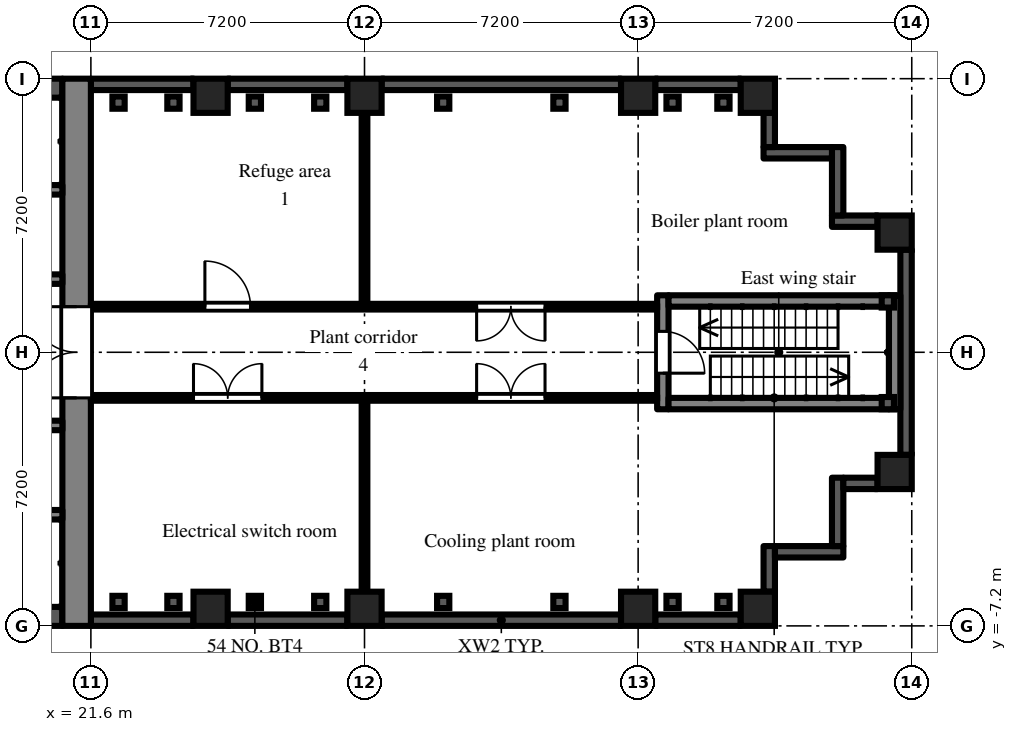
"""IFC4 building model, lengths in metres.
Left out: names, types, materials, properties, quantities, classifications, styles, units other than length and angle.
Written with IfcOpenShell. Run it as: python <this file> out.ifc"""

import sys

from ifc_helpers import new_model, si_unit, direction, frame, frame_2d, origin, origin_2d, place, context, subcontext, project, spatial, rectangle, extrude, element, fill, save


model = new_model("IFC4")
c1 = context("Model", 3, precision=1e-05, world=origin(), true_north=direction((0.0, 1.0)))
c2 = subcontext(c1, "Body", "Model", "MODEL_VIEW")
j1 = project(units=[si_unit("LENGTHUNIT", "METRE"), si_unit("PLANEANGLEUNIT", "RADIAN")], contexts=[c1])
p1 = place(None, origin())
s1 = spatial("IfcSite", under=j1, at=p1, CompositionType="ELEMENT")
p2 = place(p1, origin())
s2 = spatial("IfcBuilding", under=s1, at=p2, CompositionType="ELEMENT")
p3 = place(p2, frame((0.0, 0.0, 111.9)))
s3 = spatial("IfcBuildingStorey", under=s2, at=p3, CompositionType="ELEMENT", Elevation=111.9)
for number, where, z_axis, x_axis in (
    (1, (24.75, -6.75, 0.0), (0.0, 0.0, 1.0), (1.0, 0.0, 0.0)),
    (2, (24.75, 6.75, 0.0), (0.0, 0.0, 1.0), (1.0, 0.0, 0.0)),
    (3, (28.8, -6.75, 0.0), (0.0, 0.0, 1.0), (1.0, 0.0, 0.0)),
    (4, (28.8, 6.75, 0.0), (0.0, 0.0, 1.0), (1.0, 0.0, 0.0)),
    (5, (36.0, -6.75, 0.0), (0.0, 0.0, 1.0), (1.0, 0.0, 0.0)),
    (6, (36.0, 6.75, 0.0), (0.0, 0.0, 1.0), (1.0, 0.0, 0.0)),
    (7, (39.15, -6.75, 0.0), (0.0, 0.0, 1.0), (1.0, 0.0, 0.0)),
    (8, (39.15, 6.75, 0.0), (0.0, 0.0, 1.0), (1.0, 0.0, 0.0)),
    (9, (42.75, -3.15, 0.0), (0.0, 0.0, 1.0), (1.0, 0.0, 0.0)),
    (10, (42.75, 3.15, 0.0), (0.0, 0.0, 1.0), (1.0, 0.0, 0.0)),
):
    element("IfcColumn", number, at=place(p3, frame(where, z_axis=z_axis, x_axis=x_axis)), inside=s3, PredefinedType="COLUMN", context=c2, shape_type="SweptSolid", body=[
        extrude(rectangle(XDim=0.9, YDim=0.9, at=origin_2d()), origin(), (0.0, 0.0, 1.0), 4.2),
    ])
p4 = place(p3, frame((21.6, -7.05, 0.0), z_axis=(0.0, 0.0, 1.0), x_axis=(1.0, 0.0, 0.0)))
e11 = element("IfcWall", 11, at=p4, inside=s3, PredefinedType="SOLIDWALL", context=c2, shape_type="SweptSolid", body=[
    extrude(rectangle(XDim=2.7, YDim=0.3, at=frame_2d((1.35, 0.0))), origin(), (0.0, 0.0, 1.0), 3.4),
])
p5 = place(p3, frame((25.2, -7.05, 0.0), z_axis=(0.0, 0.0, 1.0), x_axis=(1.0, 0.0, 0.0)))
e12 = element("IfcWall", 12, at=p5, inside=s3, PredefinedType="SOLIDWALL", context=c2, shape_type="SweptSolid", body=[
    extrude(rectangle(XDim=3.15, YDim=0.3, at=frame_2d((1.575, 0.0))), origin(), (0.0, 0.0, 1.0), 3.4),
])
p6 = place(p3, frame((29.25, -7.05, 0.0), z_axis=(0.0, 0.0, 1.0), x_axis=(1.0, 0.0, 0.0)))
e13 = element("IfcWall", 13, at=p6, inside=s3, PredefinedType="SOLIDWALL", context=c2, shape_type="SweptSolid", body=[
    extrude(rectangle(XDim=6.3, YDim=0.3, at=frame_2d((3.15, 0.0))), origin(), (0.0, 0.0, 1.0), 3.4),
])
p7 = place(p3, frame((36.45, -7.05, 0.0), z_axis=(0.0, 0.0, 1.0), x_axis=(1.0, 0.0, 0.0)))
e14 = element("IfcWall", 14, at=p7, inside=s3, PredefinedType="SOLIDWALL", context=c2, shape_type="SweptSolid", body=[
    extrude(rectangle(XDim=2.25, YDim=0.3, at=frame_2d((1.125, 0.0))), origin(), (0.0, 0.0, 1.0), 3.4),
])
p8 = place(p3, frame((39.45, -6.3, 0.0), z_axis=(0.0, 0.0, 1.0), x_axis=(0.0, 1.0, 0.0)))
e15 = element("IfcWall", 15, at=p8, inside=s3, PredefinedType="SOLIDWALL", context=c2, shape_type="SweptSolid", body=[
    extrude(rectangle(XDim=1.2, YDim=0.3, at=frame_2d((0.6, 0.0))), origin(), (0.0, 0.0, 1.0), 3.8),
])
p9 = place(p3, frame((39.6, -5.25, 0.0), z_axis=(0.0, 0.0, 1.0), x_axis=(1.0, 0.0, 0.0)))
e16 = element("IfcWall", 16, at=p9, inside=s3, PredefinedType="SOLIDWALL", context=c2, shape_type="SweptSolid", body=[
    extrude(rectangle(XDim=1.8, YDim=0.3, at=frame_2d((0.9, 0.0))), origin(), (0.0, 0.0, 1.0), 3.8),
])
p10 = place(p3, frame((41.25, -5.1, 0.0), z_axis=(0.0, 0.0, 1.0), x_axis=(0.0, 1.0, 0.0)))
e17 = element("IfcWall", 17, at=p10, inside=s3, PredefinedType="SOLIDWALL", context=c2, shape_type="SweptSolid", body=[
    extrude(rectangle(XDim=1.8, YDim=0.3, at=frame_2d((0.9, 0.0))), origin(), (0.0, 0.0, 1.0), 3.8),
])
p11 = place(p3, frame((41.4, -3.45, 0.0), z_axis=(0.0, 0.0, 1.0), x_axis=(1.0, 0.0, 0.0)))
e18 = element("IfcWall", 18, at=p11, inside=s3, PredefinedType="SOLIDWALL", context=c2, shape_type="SweptSolid", body=[
    extrude(rectangle(XDim=0.9, YDim=0.3, at=frame_2d((0.45, 0.0))), origin(), (0.0, 0.0, 1.0), 3.8),
])
p12 = place(p3, frame((43.05, -2.7, 0.0), z_axis=(0.0, 0.0, 1.0), x_axis=(0.0, 1.0, 0.0)))
e19 = element("IfcWall", 19, at=p12, inside=s3, PredefinedType="SOLIDWALL", context=c2, shape_type="SweptSolid", body=[
    extrude(rectangle(XDim=5.4, YDim=0.3, at=frame_2d((2.7, 0.0))), origin(), (0.0, 0.0, 1.0), 3.4),
])
p13 = place(p3, frame((42.3, 3.45, 0.0), z_axis=(0.0, 0.0, 1.0), x_axis=(-1.0, 0.0, 0.0)))
e20 = element("IfcWall", 20, at=p13, inside=s3, PredefinedType="SOLIDWALL", context=c2, shape_type="SweptSolid", body=[
    extrude(rectangle(XDim=1.2, YDim=0.3, at=frame_2d((0.6, 0.0))), origin(), (0.0, 0.0, 1.0), 3.8),
])
p14 = place(p3, frame((41.25, 3.6, 0.0), z_axis=(0.0, 0.0, 1.0), x_axis=(0.0, 1.0, 0.0)))
e21 = element("IfcWall", 21, at=p14, inside=s3, PredefinedType="SOLIDWALL", context=c2, shape_type="SweptSolid", body=[
    extrude(rectangle(XDim=1.8, YDim=0.3, at=frame_2d((0.9, 0.0))), origin(), (0.0, 0.0, 1.0), 3.8),
])
p15 = place(p3, frame((41.1, 5.25, 0.0), z_axis=(0.0, 0.0, 1.0), x_axis=(-1.0, 0.0, 0.0)))
e22 = element("IfcWall", 22, at=p15, inside=s3, PredefinedType="SOLIDWALL", context=c2, shape_type="SweptSolid", body=[
    extrude(rectangle(XDim=1.8, YDim=0.3, at=frame_2d((0.9, 0.0))), origin(), (0.0, 0.0, 1.0), 3.8),
])
p16 = place(p3, frame((39.45, 5.4, 0.0), z_axis=(0.0, 0.0, 1.0), x_axis=(0.0, 1.0, 0.0)))
e23 = element("IfcWall", 23, at=p16, inside=s3, PredefinedType="SOLIDWALL", context=c2, shape_type="SweptSolid", body=[
    extrude(rectangle(XDim=0.9, YDim=0.3, at=frame_2d((0.45, 0.0))), origin(), (0.0, 0.0, 1.0), 3.8),
])
p17 = place(p3, frame((38.7, 7.05, 0.0), z_axis=(0.0, 0.0, 1.0), x_axis=(-1.0, 0.0, 0.0)))
e24 = element("IfcWall", 24, at=p17, inside=s3, PredefinedType="SOLIDWALL", context=c2, shape_type="SweptSolid", body=[
    extrude(rectangle(XDim=2.25, YDim=0.3, at=frame_2d((1.125, 0.0))), origin(), (0.0, 0.0, 1.0), 3.4),
])
p18 = place(p3, frame((35.55, 7.05, 0.0), z_axis=(0.0, 0.0, 1.0), x_axis=(-1.0, 0.0, 0.0)))
e25 = element("IfcWall", 25, at=p18, inside=s3, PredefinedType="SOLIDWALL", context=c2, shape_type="SweptSolid", body=[
    extrude(rectangle(XDim=6.3, YDim=0.3, at=frame_2d((3.15, 0.0))), origin(), (0.0, 0.0, 1.0), 3.4),
])
p19 = place(p3, frame((28.35, 7.05, 0.0), z_axis=(0.0, 0.0, 1.0), x_axis=(-1.0, 0.0, 0.0)))
e26 = element("IfcWall", 26, at=p19, inside=s3, PredefinedType="SOLIDWALL", context=c2, shape_type="SweptSolid", body=[
    extrude(rectangle(XDim=3.15, YDim=0.3, at=frame_2d((1.575, 0.0))), origin(), (0.0, 0.0, 1.0), 3.4),
])
p20 = place(p3, frame((24.3, 7.05, 0.0), z_axis=(0.0, 0.0, 1.0), x_axis=(-1.0, 0.0, 0.0)))
e27 = element("IfcWall", 27, at=p20, inside=s3, PredefinedType="SOLIDWALL", context=c2, shape_type="SweptSolid", body=[
    extrude(rectangle(XDim=2.7, YDim=0.3, at=frame_2d((1.35, 0.0))), origin(), (0.0, 0.0, 1.0), 3.4),
])
p21 = place(p3, frame((21.225, -7.2, 0.0), z_axis=(0.0, 0.0, 1.0), x_axis=(0.0, 1.0, 0.0)))
e28 = element("IfcWall", 28, at=p21, inside=s3, PredefinedType="SHEAR", context=c2, shape_type="SweptSolid", body=[
    extrude(rectangle(XDim=14.4, YDim=0.75, at=frame_2d((7.2, 0.0))), origin(), (0.0, 0.0, 1.0), 3.8),
])
p22 = place(p21, frame((6.0, 0.0, 0.0)))
e29 = element("IfcOpeningElement", 29, at=p22, cuts=e28, PredefinedType="OPENING", context=c2, shape_type="SweptSolid", body=[
    extrude(rectangle(XDim=2.4, YDim=2.2, at=frame_2d((1.2, 1.1))), frame((0.0, 0.385, 0.0), z_axis=(0.0, -1.0, 0.0), x_axis=(1.0, 0.0, 0.0)), (0.0, 0.0, 1.0), 0.77),
])
p23 = place(p3, frame((7.9, 6.95, 0.0), z_axis=(0.0, 0.0, 1.0), x_axis=(1.0, 0.0, 0.0)))
e30 = element("IfcWall", 30, at=p23, inside=s3, PredefinedType="SHEAR", context=c2, shape_type="SweptSolid", body=[
    extrude(rectangle(XDim=12.95, YDim=0.5, at=frame_2d((6.475, 0.0))), origin(), (0.0, 0.0, 1.0), 3.8),
])
p24 = place(p3, frame((7.9, 1.925, 0.0), z_axis=(0.0, 0.0, 1.0), x_axis=(1.0, 0.0, 0.0)))
e31 = element("IfcWall", 31, at=p24, inside=s3, PredefinedType="SHEAR", context=c2, shape_type="SweptSolid", body=[
    extrude(rectangle(XDim=12.95, YDim=0.25, at=frame_2d((6.475, 0.0))), origin(), (0.0, 0.0, 1.0), 3.8),
])
p25 = place(p24, frame((0.525, 0.0, 0.0)))
e32 = element("IfcOpeningElement", 32, at=p25, cuts=e31, PredefinedType="OPENING", context=c2, shape_type="SweptSolid", body=[
    extrude(rectangle(XDim=0.9, YDim=2.1, at=frame_2d((0.45, 1.05))), frame((0.0, 0.135, 0.0), z_axis=(0.0, -1.0, 0.0), x_axis=(1.0, 0.0, 0.0)), (0.0, 0.0, 1.0), 0.27),
])
p26 = place(p24, frame((2.625, 0.0, 0.0)))
e33 = element("IfcOpeningElement", 33, at=p26, cuts=e31, PredefinedType="OPENING", context=c2, shape_type="SweptSolid", body=[
    extrude(rectangle(XDim=1.1, YDim=2.1, at=frame_2d((0.55, 1.05))), frame((0.0, 0.135, 0.0), z_axis=(0.0, -1.0, 0.0), x_axis=(1.0, 0.0, 0.0)), (0.0, 0.0, 1.0), 0.27),
])
p27 = place(p3, frame((12.3, 4.275, 0.0), z_axis=(0.0, 0.0, 1.0), x_axis=(1.0, 0.0, 0.0)))
e34 = element("IfcWall", 34, at=p27, inside=s3, PredefinedType="SHEAR", context=c2, shape_type="SweptSolid", body=[
    extrude(rectangle(XDim=8.55, YDim=0.25, at=frame_2d((4.275, 0.0))), origin(), (0.0, 0.0, 1.0), 3.8),
])
p28 = place(p3, frame((7.9, -6.95, 0.0), z_axis=(0.0, 0.0, 1.0), x_axis=(1.0, 0.0, 0.0)))
e35 = element("IfcWall", 35, at=p28, inside=s3, PredefinedType="SHEAR", context=c2, shape_type="SweptSolid", body=[
    extrude(rectangle(XDim=12.95, YDim=0.5, at=frame_2d((6.475, 0.0))), origin(), (0.0, 0.0, 1.0), 3.8),
])
p29 = place(p3, frame((7.9, -1.925, 0.0), z_axis=(0.0, 0.0, 1.0), x_axis=(1.0, 0.0, 0.0)))
e36 = element("IfcWall", 36, at=p29, inside=s3, PredefinedType="SHEAR", context=c2, shape_type="SweptSolid", body=[
    extrude(rectangle(XDim=12.95, YDim=0.25, at=frame_2d((6.475, 0.0))), origin(), (0.0, 0.0, 1.0), 3.8),
])
p30 = place(p29, frame((4.825, 0.0, 0.0)))
e37 = element("IfcOpeningElement", 37, at=p30, cuts=e36, PredefinedType="OPENING", context=c2, shape_type="SweptSolid", body=[
    extrude(rectangle(XDim=1.1, YDim=2.1, at=frame_2d((0.55, 1.05))), frame((0.0, 0.135, 0.0), z_axis=(0.0, -1.0, 0.0), x_axis=(1.0, 0.0, 0.0)), (0.0, 0.0, 1.0), 0.27),
])
p31 = place(p29, frame((7.025, 0.0, 0.0)))
e38 = element("IfcOpeningElement", 38, at=p31, cuts=e36, PredefinedType="OPENING", context=c2, shape_type="SweptSolid", body=[
    extrude(rectangle(XDim=1.1, YDim=2.1, at=frame_2d((0.55, 1.05))), frame((0.0, 0.135, 0.0), z_axis=(0.0, -1.0, 0.0), x_axis=(1.0, 0.0, 0.0)), (0.0, 0.0, 1.0), 0.27),
])
p32 = place(p29, frame((9.225, 0.0, 0.0)))
e39 = element("IfcOpeningElement", 39, at=p32, cuts=e36, PredefinedType="OPENING", context=c2, shape_type="SweptSolid", body=[
    extrude(rectangle(XDim=1.1, YDim=2.1, at=frame_2d((0.55, 1.05))), frame((0.0, 0.135, 0.0), z_axis=(0.0, -1.0, 0.0), x_axis=(1.0, 0.0, 0.0)), (0.0, 0.0, 1.0), 0.27),
])
p33 = place(p29, frame((0.525, 0.0, 0.0)))
e40 = element("IfcOpeningElement", 40, at=p33, cuts=e36, PredefinedType="OPENING", context=c2, shape_type="SweptSolid", body=[
    extrude(rectangle(XDim=0.9, YDim=2.1, at=frame_2d((0.45, 1.05))), frame((0.0, 0.135, 0.0), z_axis=(0.0, -1.0, 0.0), x_axis=(1.0, 0.0, 0.0)), (0.0, 0.0, 1.0), 0.27),
])
p34 = place(p29, frame((2.625, 0.0, 0.0)))
e41 = element("IfcOpeningElement", 41, at=p34, cuts=e36, PredefinedType="OPENING", context=c2, shape_type="SweptSolid", body=[
    extrude(rectangle(XDim=1.1, YDim=2.1, at=frame_2d((0.55, 1.05))), frame((0.0, 0.135, 0.0), z_axis=(0.0, -1.0, 0.0), x_axis=(1.0, 0.0, 0.0)), (0.0, 0.0, 1.0), 0.27),
])
p35 = place(p3, frame((12.3, -4.275, 0.0), z_axis=(0.0, 0.0, 1.0), x_axis=(1.0, 0.0, 0.0)))
e42 = element("IfcWall", 42, at=p35, inside=s3, PredefinedType="SHEAR", context=c2, shape_type="SweptSolid", body=[
    extrude(rectangle(XDim=8.55, YDim=0.25, at=frame_2d((4.275, 0.0))), origin(), (0.0, 0.0, 1.0), 3.8),
])
p36 = place(p3, frame((36.65, -1.5, 0.0), z_axis=(0.0, 0.0, 1.0), x_axis=(0.0, 1.0, 0.0)))
e43 = element("IfcWall", 43, at=p36, inside=s3, PredefinedType="SHEAR", context=c2, shape_type="SweptSolid", body=[
    extrude(rectangle(XDim=3.0, YDim=0.3, at=frame_2d((1.5, 0.0))), origin(), (0.0, 0.0, 1.0), 3.8),
])
p37 = place(p36, frame((0.95, 0.0, 0.0)))
e44 = element("IfcOpeningElement", 44, at=p37, cuts=e43, PredefinedType="OPENING", context=c2, shape_type="SweptSolid", body=[
    extrude(rectangle(XDim=1.1, YDim=2.1, at=frame_2d((0.55, 1.05))), frame((0.0, 0.16, 0.0), z_axis=(0.0, -1.0, 0.0), x_axis=(1.0, 0.0, 0.0)), (0.0, 0.0, 1.0), 0.32),
])
p38 = place(p3, frame((42.75, -1.5, 0.0), z_axis=(0.0, 0.0, 1.0), x_axis=(0.0, 1.0, 0.0)))
e45 = element("IfcWall", 45, at=p38, inside=s3, PredefinedType="SHEAR", context=c2, shape_type="SweptSolid", body=[
    extrude(rectangle(XDim=3.0, YDim=0.3, at=frame_2d((1.5, 0.0))), origin(), (0.0, 0.0, 1.0), 3.8),
])
for number, where, z_axis, x_axis in (
    (46, (36.8, -1.35, 0.0), (0.0, 0.0, 1.0), (1.0, 0.0, 0.0)),
    (47, (36.8, 1.35, 0.0), (0.0, 0.0, 1.0), (1.0, 0.0, 0.0)),
):
    element("IfcWall", number, at=place(p3, frame(where, z_axis=z_axis, x_axis=x_axis)), inside=s3, PredefinedType="SHEAR", context=c2, shape_type="SweptSolid", body=[
        extrude(rectangle(XDim=5.8, YDim=0.3, at=frame_2d((2.9, 0.0))), origin(), (0.0, 0.0, 1.0), 3.8),
    ])
p39 = place(p3, frame((21.6, -1.2, 0.0), z_axis=(0.0, 0.0, 1.0), x_axis=(1.0, 0.0, 0.0)))
e48 = element("IfcWall", 48, at=p39, inside=s3, PredefinedType="PARTITIONING", context=c2, shape_type="SweptSolid", body=[
    extrude(rectangle(XDim=14.9, YDim=0.15, at=frame_2d((7.45, 0.0))), origin(), (0.0, 0.0, 1.0), 3.8),
])
p40 = place(p39, frame((2.7, 0.0, 0.0)))
e49 = element("IfcOpeningElement", 49, at=p40, cuts=e48, PredefinedType="OPENING", context=c2, shape_type="SweptSolid", body=[
    extrude(rectangle(XDim=1.8, YDim=2.1, at=frame_2d((0.9, 1.05))), frame((0.0, 0.085, 0.0), z_axis=(0.0, -1.0, 0.0), x_axis=(1.0, 0.0, 0.0)), (0.0, 0.0, 1.0), 0.17),
])
p41 = place(p39, frame((10.15, 0.0, 0.0)))
e50 = element("IfcOpeningElement", 50, at=p41, cuts=e48, PredefinedType="OPENING", context=c2, shape_type="SweptSolid", body=[
    extrude(rectangle(XDim=1.8, YDim=2.1, at=frame_2d((0.9, 1.05))), frame((0.0, 0.085, 0.0), z_axis=(0.0, -1.0, 0.0), x_axis=(1.0, 0.0, 0.0)), (0.0, 0.0, 1.0), 0.17),
])
p42 = place(p3, frame((21.6, 1.2, 0.0), z_axis=(0.0, 0.0, 1.0), x_axis=(1.0, 0.0, 0.0)))
e51 = element("IfcWall", 51, at=p42, inside=s3, PredefinedType="PARTITIONING", context=c2, shape_type="SweptSolid", body=[
    extrude(rectangle(XDim=14.9, YDim=0.15, at=frame_2d((7.45, 0.0))), origin(), (0.0, 0.0, 1.0), 3.8),
])
p43 = place(p42, frame((3.0, 0.0, 0.0)))
e52 = element("IfcOpeningElement", 52, at=p43, cuts=e51, PredefinedType="OPENING", context=c2, shape_type="SweptSolid", body=[
    extrude(rectangle(XDim=1.2, YDim=2.1, at=frame_2d((0.6, 1.05))), frame((0.0, 0.085, 0.0), z_axis=(0.0, -1.0, 0.0), x_axis=(1.0, 0.0, 0.0)), (0.0, 0.0, 1.0), 0.17),
])
p44 = place(p42, frame((10.15, 0.0, 0.0)))
e53 = element("IfcOpeningElement", 53, at=p44, cuts=e51, PredefinedType="OPENING", context=c2, shape_type="SweptSolid", body=[
    extrude(rectangle(XDim=1.8, YDim=2.1, at=frame_2d((0.9, 1.05))), frame((0.0, 0.085, 0.0), z_axis=(0.0, -1.0, 0.0), x_axis=(1.0, 0.0, 0.0)), (0.0, 0.0, 1.0), 0.17),
])
for number, where, z_axis, x_axis in (
    (54, (28.8, -6.9, 0.0), (0.0, 0.0, 1.0), (0.0, 1.0, 0.0)),
    (55, (28.8, 1.275, 0.0), (0.0, 0.0, 1.0), (0.0, 1.0, 0.0)),
):
    element("IfcWall", number, at=place(p3, frame(where, z_axis=z_axis, x_axis=x_axis)), inside=s3, PredefinedType="PARTITIONING", context=c2, shape_type="SweptSolid", body=[
        extrude(rectangle(XDim=5.625, YDim=0.15, at=frame_2d((2.812, 0.0))), origin(), (0.0, 0.0, 1.0), 3.8),
    ])
p45 = place(p22, origin())
e56 = element("IfcDoor", 56, at=p45, inside=s3, OperationType="DOUBLE_DOOR_DOUBLE_SWING", PredefinedType="DOOR", context=c2, shape_type="SweptSolid", body=[
    extrude(rectangle(XDim=2.4, YDim=2.2, at=frame_2d((1.2, 1.1))), frame((0.0, 0.025, 0.0), z_axis=(0.0, -1.0, 0.0), x_axis=(1.0, 0.0, 0.0)), (0.0, 0.0, 1.0), 0.05),
])
fill(e29, e56)
p46 = place(p37, frame((1.1, 0.0, 0.0), z_axis=(0.0, 0.0, 1.0), x_axis=(-1.0, 0.0, 0.0)))
e57 = element("IfcDoor", 57, at=p46, inside=s3, OperationType="SINGLE_SWING_RIGHT", PredefinedType="DOOR", context=c2, shape_type="SweptSolid", body=[
    extrude(rectangle(XDim=1.1, YDim=2.1, at=frame_2d((0.55, 1.05))), frame((0.0, 0.025, 0.0), z_axis=(0.0, -1.0, 0.0), x_axis=(1.0, 0.0, 0.0)), (0.0, 0.0, 1.0), 0.05),
])
fill(e44, e57)
p47 = place(p43, origin())
e58 = element("IfcDoor", 58, at=p47, inside=s3, OperationType="SINGLE_SWING_LEFT", PredefinedType="DOOR", context=c2, shape_type="SweptSolid", body=[
    extrude(rectangle(XDim=1.2, YDim=2.1, at=frame_2d((0.6, 1.05))), frame((0.0, 0.025, 0.0), z_axis=(0.0, -1.0, 0.0), x_axis=(1.0, 0.0, 0.0)), (0.0, 0.0, 1.0), 0.05),
])
fill(e52, e58)
p48 = place(p44, frame((1.8, 0.0, 0.0), z_axis=(0.0, 0.0, 1.0), x_axis=(-1.0, 0.0, 0.0)))
e59 = element("IfcDoor", 59, at=p48, inside=s3, OperationType="DOUBLE_DOOR_DOUBLE_SWING", PredefinedType="DOOR", context=c2, shape_type="SweptSolid", body=[
    extrude(rectangle(XDim=1.8, YDim=2.1, at=frame_2d((0.9, 1.05))), frame((0.0, 0.025, 0.0), z_axis=(0.0, -1.0, 0.0), x_axis=(1.0, 0.0, 0.0)), (0.0, 0.0, 1.0), 0.05),
])
fill(e53, e59)
p49 = place(p40, origin())
e60 = element("IfcDoor", 60, at=p49, inside=s3, OperationType="DOUBLE_DOOR_DOUBLE_SWING", PredefinedType="DOOR", context=c2, shape_type="SweptSolid", body=[
    extrude(rectangle(XDim=1.8, YDim=2.1, at=frame_2d((0.9, 1.05))), frame((0.0, 0.025, 0.0), z_axis=(0.0, -1.0, 0.0), x_axis=(1.0, 0.0, 0.0)), (0.0, 0.0, 1.0), 0.05),
])
fill(e49, e60)
p50 = place(p41, origin())
e61 = element("IfcDoor", 61, at=p50, inside=s3, OperationType="DOUBLE_DOOR_DOUBLE_SWING", PredefinedType="DOOR", context=c2, shape_type="SweptSolid", body=[
    extrude(rectangle(XDim=1.8, YDim=2.1, at=frame_2d((0.9, 1.05))), frame((0.0, 0.025, 0.0), z_axis=(0.0, -1.0, 0.0), x_axis=(1.0, 0.0, 0.0)), (0.0, 0.0, 1.0), 0.05),
])
fill(e50, e61)
save(model, sys.argv[1])
